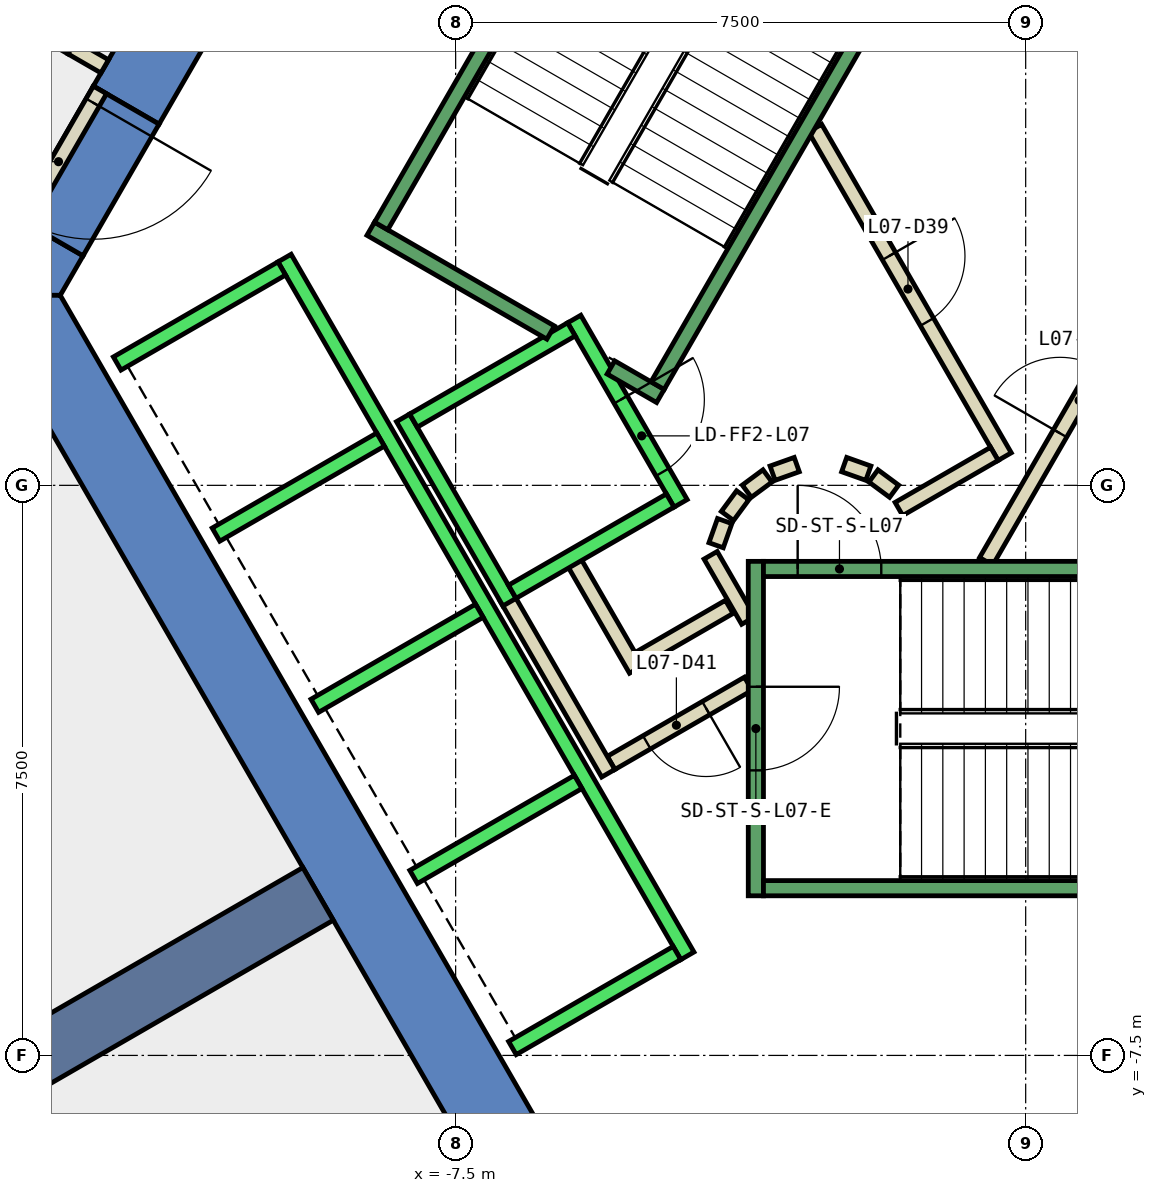
"""IFC4 building model, lengths in metres.
Left out: names, types, materials, properties, quantities, classifications, styles, units other than length and angle.
Written with IfcOpenShell. Run it as: python <this file> out.ifc"""

import sys

from ifc_helpers import new_model, si_unit, direction, frame, frame_2d, origin, place, context, subcontext, project, spatial, polyline, rectangle, outline, extrude, element, fill, save


model = new_model("IFC4")
c1 = context("Model", 3, precision=1e-05, world=origin(), true_north=direction((0.0, 1.0)))
c2 = subcontext(c1, "Body", "Model", "MODEL_VIEW")
j1 = project(units=[si_unit("LENGTHUNIT", "METRE"), si_unit("PLANEANGLEUNIT", "RADIAN")], contexts=[c1])
p1 = place(None, origin())
s1 = spatial("IfcSite", under=j1, at=p1, CompositionType="ELEMENT")
p2 = place(p1, origin())
s2 = spatial("IfcBuilding", under=s1, at=p2, CompositionType="ELEMENT")
p3 = place(p2, frame((0.0, 0.0, 39.2)))
s3 = spatial("IfcBuildingStorey", under=s2, at=p3, CompositionType="ELEMENT", Elevation=39.2)
p4 = place(p3, frame((0.0, 0.0, -0.4)))
e1 = element("IfcWall", 1, at=p4, inside=s3, PredefinedType="SHEAR", context=c2, shape_type="SweptSolid", body=[
    extrude(outline(polyline([(-12.267, 5.252), (-11.402, 4.752), (-6.351, 13.5), (-6.928, 14.5), (-12.267, 5.252)])), origin(), (0.0, 0.0, 1.0), 4.2),
])
p5 = place(p3, frame((0.0, 0.0, -0.4)))
e2 = element("IfcWall", 2, at=p5, inside=s3, PredefinedType="SHEAR", context=c2, shape_type="SweptSolid", body=[
    extrude(outline(polyline([(-12.402, 3.02), (-13.267, 3.52), (-13.856, 2.5), (-12.702, 2.5), (-12.402, 3.02)])), origin(), (0.0, 0.0, 1.0), 4.2),
])
p6 = place(p3, frame((0.0, 0.0, 3.6)))
e3 = element("IfcWall", 3, at=p6, inside=s3, PredefinedType="SHEAR", context=c2, shape_type="SweptSolid", body=[
    extrude(outline(polyline([(-13.267, 3.52), (-12.402, 3.02), (-11.402, 4.752), (-12.267, 5.252), (-13.267, 3.52)])), origin(), (0.0, 0.0, 1.0), 0.2),
])
p7 = place(p3, frame((0.0, 0.0, -0.4)))
e4 = element("IfcWall", 4, at=p7, inside=s3, PredefinedType="SHEAR", context=c2, shape_type="SweptSolid", body=[
    extrude(outline(polyline([(-13.856, 2.5), (-6.928, -9.5), (-6.351, -8.5), (-12.702, 2.5), (-13.856, 2.5)])), origin(), (0.0, 0.0, 1.0), 4.2),
])
p8 = place(p3, frame((-9.31, -5.375, -0.4), z_axis=(0.0, 0.0, 1.0), x_axis=(-0.866017533419, -0.500013631625, 0.0)))
e5 = element("IfcWall", 5, at=p8, inside=s3, PredefinedType="SHEAR", context=c2, shape_type="SweptSolid", body=[
    extrude(rectangle(XDim=9.0, YDim=0.8, at=frame_2d((4.5, 0.0))), origin(), (0.0, 0.0, 1.0), 4.2),
])
p9 = place(p3, frame((-15.963, 7.733, 0.0), z_axis=(0.0, 0.0, 1.0), x_axis=(0.865965832374, -0.500103166518, 0.0)))
e6 = element("IfcWall", 6, at=p9, inside=s3, PredefinedType="PARTITIONING", context=c2, shape_type="SweptSolid", body=[
    extrude(rectangle(XDim=3.941, YDim=0.2, at=frame_2d((1.971, 0.0))), origin(), (0.0, 0.0, 1.0), 3.8),
])
p10 = place(p3, frame((-3.9, -1.599, 0.0), z_axis=(0.0, 0.0, 1.0), x_axis=(-0.865969445389, -0.500096910261, 0.0)))
e7 = element("IfcWall", 7, at=p10, inside=s3, PredefinedType="PARTITIONING", context=c2, shape_type="SweptSolid", body=[
    extrude(rectangle(XDim=1.373, YDim=0.2, at=frame_2d((0.687, 0.0))), origin(), (0.0, 0.0, 1.0), 3.8),
])
p11 = place(p3, frame((-5.126, -2.422, 0.0), z_axis=(0.0, 0.0, 1.0), x_axis=(-0.500062241894, 0.865989465428, 0.0)))
e8 = element("IfcWall", 8, at=p11, inside=s3, PredefinedType="PARTITIONING", context=c2, shape_type="SweptSolid", body=[
    extrude(rectangle(XDim=1.7, YDim=0.2, at=frame_2d((0.85, 0.0))), origin(), (0.0, 0.0, 1.0), 3.8),
])
p12 = place(p3, frame((-3.65, -2.61, 0.0), z_axis=(0.0, 0.0, 1.0), x_axis=(-0.866072462134, -0.499918483688, 0.0)))
e9 = element("IfcWall", 9, at=p12, inside=s3, PredefinedType="PARTITIONING", context=c2, shape_type="SweptSolid", body=[
    extrude(rectangle(XDim=2.084, YDim=0.2, at=frame_2d((1.042, 0.0))), origin(), (0.0, 0.0, 1.0), 3.8),
])
p13 = place(p12, frame((0.642, 0.0, 0.0)))
e10 = element("IfcOpeningElement", 10, at=p13, cuts=e9, PredefinedType="OPENING", context=c2, shape_type="SweptSolid", body=[
    extrude(rectangle(XDim=0.9, YDim=2.1, at=frame_2d((0.45, 1.05))), frame((0.0, 0.11, 0.0), z_axis=(0.0, -1.0, 0.0), x_axis=(1.0, 0.0, 0.0)), (0.0, 0.0, 1.0), 0.22),
])
p14 = place(p3, frame((-5.492, -3.788, 0.0), z_axis=(0.0, 0.0, 1.0), x_axis=(-0.500008949224, 0.866020236886, 0.0)))
e11 = element("IfcWall", 11, at=p14, inside=s3, PredefinedType="PARTITIONING", context=c2, shape_type="SweptSolid", body=[
    extrude(rectangle(XDim=2.68, YDim=0.2, at=frame_2d((1.34, 0.0))), origin(), (0.0, 0.0, 1.0), 3.8),
])
p15 = place(p3, frame((-4.145, -0.92, 0.0), z_axis=(0.0, 0.0, 1.0), x_axis=(0.499743786207, -0.866173278362, 0.0)))
e12 = element("IfcWall", 12, at=p15, inside=s3, PredefinedType="PARTITIONING", context=c2, shape_type="SweptSolid", body=[
    extrude(rectangle(XDim=0.991, YDim=0.2, at=frame_2d((0.495, 0.0))), origin(), (0.0, 0.0, 1.0), 3.8),
])
p16 = place(p3, frame((-0.52, -1.0, 0.0), z_axis=(0.0, 0.0, 1.0), x_axis=(0.50011622646, 0.865958290007, 0.0)))
e13 = element("IfcWall", 13, at=p16, inside=s3, PredefinedType="PARTITIONING", context=c2, shape_type="SweptSolid", body=[
    extrude(rectangle(XDim=4.991, YDim=0.2, at=frame_2d((2.496, 0.0))), origin(), (0.0, 0.0, 1.0), 3.8),
])
p17 = place(p16, frame((1.945, 0.0, 0.0)))
e14 = element("IfcOpeningElement", 14, at=p17, cuts=e13, PredefinedType="OPENING", context=c2, shape_type="SweptSolid", body=[
    extrude(rectangle(XDim=1.0, YDim=2.1, at=frame_2d((0.5, 1.05))), frame((0.0, 0.11, 0.0), z_axis=(0.0, -1.0, 0.0), x_axis=(1.0, 0.0, 0.0)), (0.0, 0.0, 1.0), 0.22),
])
p18 = place(p3, frame((-2.771, 4.7, 0.0), z_axis=(0.0, 0.0, 1.0), x_axis=(0.499969479948, -0.866043023828, 0.0)))
e15 = element("IfcWall", 15, at=p18, inside=s3, PredefinedType="PARTITIONING", context=c2, shape_type="SweptSolid", body=[
    extrude(rectangle(XDim=4.99, YDim=0.2, at=frame_2d((2.495, 0.0))), origin(), (0.0, 0.0, 1.0), 3.8),
])
p19 = place(p18, frame((1.945, 0.0, 0.0)))
e16 = element("IfcOpeningElement", 16, at=p19, cuts=e15, PredefinedType="OPENING", context=c2, shape_type="SweptSolid", body=[
    extrude(rectangle(XDim=1.0, YDim=2.1, at=frame_2d((0.5, 1.05))), frame((0.0, 0.11, 0.0), z_axis=(0.0, -1.0, 0.0), x_axis=(1.0, 0.0, 0.0)), (0.0, 0.0, 1.0), 0.22),
])
p20 = place(p3, frame((-0.412, 0.414, 0.0), z_axis=(0.0, 0.0, 1.0), x_axis=(-0.866017369001, -0.500013916395, 0.0)))
e17 = element("IfcWall", 17, at=p20, inside=s3, PredefinedType="PARTITIONING", context=c2, shape_type="SweptSolid", body=[
    extrude(rectangle(XDim=1.45, YDim=0.2, at=frame_2d((0.725, 0.0))), origin(), (0.0, 0.0, 1.0), 3.8),
])
p21 = place(p3, frame((-1.731, -0.077, 0.0), z_axis=(0.0, 0.0, 1.0), x_axis=(-0.804311165252, 0.594208338422, 0.0)))
e18 = element("IfcWall", 18, at=p21, inside=s3, PredefinedType="PARTITIONING", context=c2, shape_type="SweptSolid", body=[
    extrude(rectangle(XDim=0.338, YDim=0.2, at=frame_2d((0.169, 0.0))), origin(), (0.0, 0.0, 1.0), 3.8),
])
p22 = place(p3, frame((-2.07, 0.16, 0.0), z_axis=(0.0, 0.0, 1.0), x_axis=(-0.942199461132, 0.335052496547, 0.0)))
e19 = element("IfcWall", 19, at=p22, inside=s3, PredefinedType="PARTITIONING", context=c2, shape_type="SweptSolid", body=[
    extrude(rectangle(XDim=0.337, YDim=0.2, at=frame_2d((0.169, 0.0))), origin(), (0.0, 0.0, 1.0), 3.8),
])
p23 = place(p3, frame((-3.012, 0.273, 0.0), z_axis=(0.0, 0.0, 1.0), x_axis=(-0.942280615813, -0.334824194261, 0.0)))
e20 = element("IfcWall", 20, at=p23, inside=s3, PredefinedType="PARTITIONING", context=c2, shape_type="SweptSolid", body=[
    extrude(rectangle(XDim=0.338, YDim=0.2, at=frame_2d((0.169, 0.0))), origin(), (0.0, 0.0, 1.0), 3.8),
])
p24 = place(p3, frame((-3.397, 0.124, 0.0), z_axis=(0.0, 0.0, 1.0), x_axis=(-0.804311165252, -0.594208338422, 0.0)))
e21 = element("IfcWall", 21, at=p24, inside=s3, PredefinedType="PARTITIONING", context=c2, shape_type="SweptSolid", body=[
    extrude(rectangle(XDim=0.338, YDim=0.2, at=frame_2d((0.169, 0.0))), origin(), (0.0, 0.0, 1.0), 3.8),
])
p25 = place(p3, frame((-3.723, -0.131, 0.0), z_axis=(0.0, 0.0, 1.0), x_axis=(-0.594675113454, -0.803966112121, 0.0)))
e22 = element("IfcWall", 22, at=p25, inside=s3, PredefinedType="PARTITIONING", context=c2, shape_type="SweptSolid", body=[
    extrude(rectangle(XDim=0.338, YDim=0.2, at=frame_2d((0.169, 0.0))), origin(), (0.0, 0.0, 1.0), 3.8),
])
p26 = place(p3, frame((-3.96, -0.47, 0.0), z_axis=(0.0, 0.0, 1.0), x_axis=(-0.334824194261, -0.942280615813, 0.0)))
e23 = element("IfcWall", 23, at=p26, inside=s3, PredefinedType="PARTITIONING", context=c2, shape_type="SweptSolid", body=[
    extrude(rectangle(XDim=0.338, YDim=0.2, at=frame_2d((0.169, 0.0))), origin(), (0.0, 0.0, 1.0), 3.8),
])
p27 = place(p3, frame((-12.18, 5.202, 0.0), z_axis=(0.0, 0.0, 1.0), x_axis=(-0.50002537861, -0.866010750942, 0.0)))
e24 = element("IfcWall", 24, at=p27, inside=s3, PredefinedType="PARTITIONING", context=c2, shape_type="SweptSolid", body=[
    extrude(rectangle(XDim=2.0, YDim=0.2, at=frame_2d((1.0, 0.0))), origin(), (0.0, 0.0, 1.0), 2.4),
])
p28 = place(p27, frame((0.19, 0.0, 0.0)))
e25 = element("IfcOpeningElement", 25, at=p28, cuts=e24, PredefinedType="OPENING", context=c2, shape_type="SweptSolid", body=[
    extrude(rectangle(XDim=1.8, YDim=2.1, at=frame_2d((0.9, 1.05))), frame((0.0, 0.11, 0.0), z_axis=(0.0, -1.0, 0.0), x_axis=(1.0, 0.0, 0.0)), (0.0, 0.0, 1.0), 0.22),
])
p29 = place(p3, frame((-12.55, 5.762, 0.0), z_axis=(0.0, 0.0, 1.0), x_axis=(0.866071776036, -0.499919672301, 0.0)))
e26 = element("IfcWall", 26, at=p29, inside=s3, PredefinedType="PARTITIONING", context=c2, shape_type="SweptSolid", body=[
    extrude(rectangle(XDim=0.5, YDim=0.2, at=frame_2d((0.25, 0.0))), origin(), (0.0, 0.0, 1.0), 2.4),
])
p30 = place(p3, frame((-5.94, 2.188, 0.0), z_axis=(0.0, 0.0, 1.0), x_axis=(0.49994636267, -0.866056369097, 0.0)))
e27 = element("IfcWall", 27, at=p30, inside=s3, PredefinedType="STANDARD", context=c2, shape_type="SweptSolid", body=[
    extrude(rectangle(XDim=2.8, YDim=0.2, at=frame_2d((1.4, 0.0))), origin(), (0.0, 0.0, 1.0), 3.8),
])
p31 = place(p30, frame((1.225, 0.0, 0.0)))
e28 = element("IfcOpeningElement", 28, at=p31, cuts=e27, PredefinedType="OPENING", context=c2, shape_type="SweptSolid", body=[
    extrude(rectangle(XDim=1.1, YDim=2.1, at=frame_2d((0.55, 1.05))), frame((0.0, 0.11, 0.0), z_axis=(0.0, -1.0, 0.0), x_axis=(1.0, 0.0, 0.0)), (0.0, 0.0, 1.0), 0.22),
])
p32 = place(p3, frame((-8.192, 0.888, 0.0), z_axis=(0.0, 0.0, 1.0), x_axis=(0.49994636267, -0.866056369097, 0.0)))
e29 = element("IfcWall", 29, at=p32, inside=s3, PredefinedType="STANDARD", context=c2, shape_type="SweptSolid", body=[
    extrude(rectangle(XDim=2.8, YDim=0.2, at=frame_2d((1.4, 0.0))), origin(), (0.0, 0.0, 1.0), 3.8),
])
for number, where, z_axis, x_axis in (
    (30, (-5.977, 2.052, 0.0), (0.0, 0.0, 1.0), (-0.866, -0.5, 0.0)),
    (31, (-4.677, -0.2, 0.0), (0.0, 0.0, 1.0), (-0.866, -0.5, 0.0)),
):
    element("IfcWall", number, at=place(p3, frame(where, z_axis=z_axis, x_axis=x_axis)), inside=s3, PredefinedType="STANDARD", context=c2, shape_type="SweptSolid", body=[
        extrude(rectangle(XDim=2.399, YDim=0.2, at=frame_2d((1.2, 0.0))), origin(), (0.0, 0.0, 1.0), 3.8),
    ])
p33 = place(p3, frame((-9.751, 2.99, 0.0), z_axis=(0.0, 0.0, 1.0), x_axis=(0.50000090737, -0.866024879913, 0.0)))
e32 = element("IfcWall", 32, at=p33, inside=s3, PredefinedType="STANDARD", context=c2, shape_type="SweptSolid", body=[
    extrude(rectangle(XDim=10.6, YDim=0.2, at=frame_2d((5.3, 0.0))), origin(), (0.0, 0.0, 1.0), 3.8),
])
p34 = place(p3, frame((-9.788, 2.853, 0.0), z_axis=(0.0, 0.0, 1.0), x_axis=(-0.865998541277, -0.500046524342, 0.0)))
e33 = element("IfcWall", 33, at=p34, inside=s3, PredefinedType="STANDARD", context=c2, shape_type="SweptSolid", body=[
    extrude(rectangle(XDim=2.5, YDim=0.2, at=frame_2d((1.25, 0.0))), origin(), (0.0, 0.0, 1.0), 3.8),
])
for number, where, z_axis, x_axis in (
    (34, (-8.488, 0.602, 0.0), (0.0, 0.0, 1.0), (-0.866, -0.5, 0.0)),
    (35, (-7.188, -1.65, 0.0), (0.0, 0.0, 1.0), (-0.866, -0.5, 0.0)),
    (36, (-5.888, -3.902, 0.0), (0.0, 0.0, 1.0), (-0.866, -0.5, 0.0)),
    (37, (-4.588, -6.153, 0.0), (0.0, 0.0, 1.0), (-0.866, -0.5, 0.0)),
):
    element("IfcWall", number, at=place(p3, frame(where, z_axis=z_axis, x_axis=x_axis)), inside=s3, PredefinedType="STANDARD", context=c2, shape_type="SweptSolid", body=[
        extrude(rectangle(XDim=2.5, YDim=0.2, at=frame_2d((1.25, 0.0))), origin(), (0.0, 0.0, 1.0), 3.8),
    ])
p35 = place(p3, frame((-3.55, -1.0, 0.0), z_axis=(0.0, 0.0, 1.0), x_axis=(0.0, -1.0, 0.0)))
e38 = element("IfcWall", 38, at=p35, inside=s3, PredefinedType="STANDARD", context=c2, shape_type="SweptSolid", body=[
    extrude(rectangle(XDim=4.4, YDim=0.2, at=frame_2d((2.2, 0.0))), origin(), (0.0, 0.0, 1.0), 3.8),
])
p36 = place(p35, frame((1.65, 0.0, 0.0)))
e39 = element("IfcOpeningElement", 39, at=p36, cuts=e38, PredefinedType="OPENING", context=c2, shape_type="SweptSolid", body=[
    extrude(rectangle(XDim=1.1, YDim=2.2, at=frame_2d((0.55, 1.1))), frame((0.0, 0.11, 0.0), z_axis=(0.0, -1.0, 0.0), x_axis=(1.0, 0.0, 0.0)), (0.0, 0.0, 1.0), 0.22),
])
p37 = place(p3, frame((-3.45, -1.1, 0.0), z_axis=(0.0, 0.0, 1.0), x_axis=(1.0, 0.0, 0.0)))
e40 = element("IfcWall", 40, at=p37, inside=s3, PredefinedType="STANDARD", context=c2, shape_type="SweptSolid", body=[
    extrude(rectangle(XDim=6.9, YDim=0.2, at=frame_2d((3.45, 0.0))), origin(), (0.0, 0.0, 1.0), 3.8),
])
p38 = place(p37, frame((0.45, 0.0, 0.0)))
e41 = element("IfcOpeningElement", 41, at=p38, cuts=e40, PredefinedType="OPENING", context=c2, shape_type="SweptSolid", body=[
    extrude(rectangle(XDim=1.1, YDim=2.2, at=frame_2d((0.55, 1.1))), frame((0.0, 0.11, 0.0), z_axis=(0.0, -1.0, 0.0), x_axis=(1.0, 0.0, 0.0)), (0.0, 0.0, 1.0), 0.22),
])
p39 = place(p3, frame((-3.45, -5.3, 0.0), z_axis=(0.0, 0.0, 1.0), x_axis=(1.0, 0.0, 0.0)))
e42 = element("IfcWall", 42, at=p39, inside=s3, PredefinedType="STANDARD", context=c2, shape_type="SweptSolid", body=[
    extrude(rectangle(XDim=6.9, YDim=0.2, at=frame_2d((3.45, 0.0))), origin(), (0.0, 0.0, 1.0), 3.8),
])
p40 = place(p3, frame((-6.25, 2.01, 0.0), z_axis=(0.0, 0.0, 1.0), x_axis=(-0.86611865017, 0.499838457731, 0.0)))
e43 = element("IfcWall", 43, at=p40, inside=s3, PredefinedType="STANDARD", context=c2, shape_type="SweptSolid", body=[
    extrude(rectangle(XDim=2.733, YDim=0.2, at=frame_2d((1.366, 0.0))), origin(), (0.0, 0.0, 1.0), 3.8),
])
p41 = place(p3, frame((-4.806, 1.176, 0.0), z_axis=(0.0, 0.0, 1.0), x_axis=(-0.866558586415, 0.499075361355, 0.0)))
e44 = element("IfcWall", 44, at=p41, inside=s3, PredefinedType="STANDARD", context=c2, shape_type="SweptSolid", body=[
    extrude(rectangle(XDim=0.751, YDim=0.2, at=frame_2d((0.376, 0.0))), origin(), (0.0, 0.0, 1.0), 3.8),
])
p42 = place(p3, frame((-1.393, 7.288, 0.0), z_axis=(0.0, 0.0, 1.0), x_axis=(-0.499963383562, -0.866046543262, 0.0)))
e45 = element("IfcWall", 45, at=p42, inside=s3, PredefinedType="STANDARD", context=c2, shape_type="SweptSolid", body=[
    extrude(rectangle(XDim=6.9, YDim=0.2, at=frame_2d((3.45, 0.0))), origin(), (0.0, 0.0, 1.0), 3.8),
])
p43 = place(p42, frame((0.45, 0.0, 0.0)))
e46 = element("IfcOpeningElement", 46, at=p43, cuts=e45, PredefinedType="OPENING", context=c2, shape_type="SweptSolid", body=[
    extrude(rectangle(XDim=1.1, YDim=2.2, at=frame_2d((0.55, 1.1))), frame((0.0, 0.11, 0.0), z_axis=(0.0, -1.0, 0.0), x_axis=(1.0, 0.0, 0.0)), (0.0, 0.0, 1.0), 0.22),
])
p44 = place(p3, frame((-5.03, 9.388, 0.0), z_axis=(0.0, 0.0, 1.0), x_axis=(-0.499978703459, -0.866037698999, 0.0)))
e47 = element("IfcWall", 47, at=p44, inside=s3, PredefinedType="STANDARD", context=c2, shape_type="SweptSolid", body=[
    extrude(rectangle(XDim=6.9, YDim=0.2, at=frame_2d((3.45, 0.0))), origin(), (0.0, 0.0, 1.0), 3.8),
])
p45 = place(p17, origin())
e48 = element("IfcDoor", 48, at=p45, inside=s3, OperationType="SINGLE_SWING_LEFT", PredefinedType="DOOR", context=c2, shape_type="SweptSolid", body=[
    extrude(rectangle(XDim=1.0, YDim=2.1, at=frame_2d((0.5, 1.05))), frame((0.0, 0.025, 0.0), z_axis=(0.0, -1.0, 0.0), x_axis=(1.0, 0.0, 0.0)), (0.0, 0.0, 1.0), 0.05),
])
fill(e14, e48)
p46 = place(p19, origin())
e49 = element("IfcDoor", 49, at=p46, inside=s3, OperationType="SINGLE_SWING_RIGHT", PredefinedType="DOOR", context=c2, shape_type="SweptSolid", body=[
    extrude(rectangle(XDim=1.0, YDim=2.1, at=frame_2d((0.5, 1.05))), frame((0.0, 0.025, 0.0), z_axis=(0.0, -1.0, 0.0), x_axis=(1.0, 0.0, 0.0)), (0.0, 0.0, 1.0), 0.05),
])
fill(e16, e49)
p47 = place(p13, origin())
e50 = element("IfcDoor", 50, at=p47, inside=s3, OperationType="SINGLE_SWING_LEFT", PredefinedType="DOOR", context=c2, shape_type="SweptSolid", body=[
    extrude(rectangle(XDim=0.9, YDim=2.1, at=frame_2d((0.45, 1.05))), frame((0.0, 0.025, 0.0), z_axis=(0.0, -1.0, 0.0), x_axis=(1.0, 0.0, 0.0)), (0.0, 0.0, 1.0), 0.05),
])
fill(e10, e50)
p48 = place(p28, origin())
e51 = element("IfcDoor", 51, at=p48, inside=s3, OperationType="DOUBLE_DOOR_SINGLE_SWING", PredefinedType="DOOR", context=c2, shape_type="SweptSolid", body=[
    extrude(rectangle(XDim=1.8, YDim=2.1, at=frame_2d((0.9, 1.05))), frame((0.0, 0.025, 0.0), z_axis=(0.0, -1.0, 0.0), x_axis=(1.0, 0.0, 0.0)), (0.0, 0.0, 1.0), 0.05),
])
fill(e25, e51)
p49 = place(p31, origin())
e52 = element("IfcDoor", 52, at=p49, inside=s3, OperationType="SLIDING_TO_LEFT", PredefinedType="DOOR", context=c2, shape_type="SweptSolid", body=[
    extrude(rectangle(XDim=1.1, YDim=2.1, at=frame_2d((0.55, 1.05))), frame((0.0, 0.025, 0.0), z_axis=(0.0, -1.0, 0.0), x_axis=(1.0, 0.0, 0.0)), (0.0, 0.0, 1.0), 0.05),
])
fill(e28, e52)
p50 = place(p38, origin())
e53 = element("IfcDoor", 53, at=p50, inside=s3, OperationType="SINGLE_SWING_LEFT", PredefinedType="DOOR", context=c2, shape_type="SweptSolid", body=[
    extrude(rectangle(XDim=1.1, YDim=2.2, at=frame_2d((0.55, 1.1))), frame((0.0, 0.025, 0.0), z_axis=(0.0, -1.0, 0.0), x_axis=(1.0, 0.0, 0.0)), (0.0, 0.0, 1.0), 0.05),
])
fill(e41, e53)
p51 = place(p36, origin())
e54 = element("IfcDoor", 54, at=p51, inside=s3, OperationType="SINGLE_SWING_LEFT", PredefinedType="DOOR", context=c2, shape_type="SweptSolid", body=[
    extrude(rectangle(XDim=1.1, YDim=2.2, at=frame_2d((0.55, 1.1))), frame((0.0, 0.025, 0.0), z_axis=(0.0, -1.0, 0.0), x_axis=(1.0, 0.0, 0.0)), (0.0, 0.0, 1.0), 0.05),
])
fill(e39, e54)
save(model, sys.argv[1])
